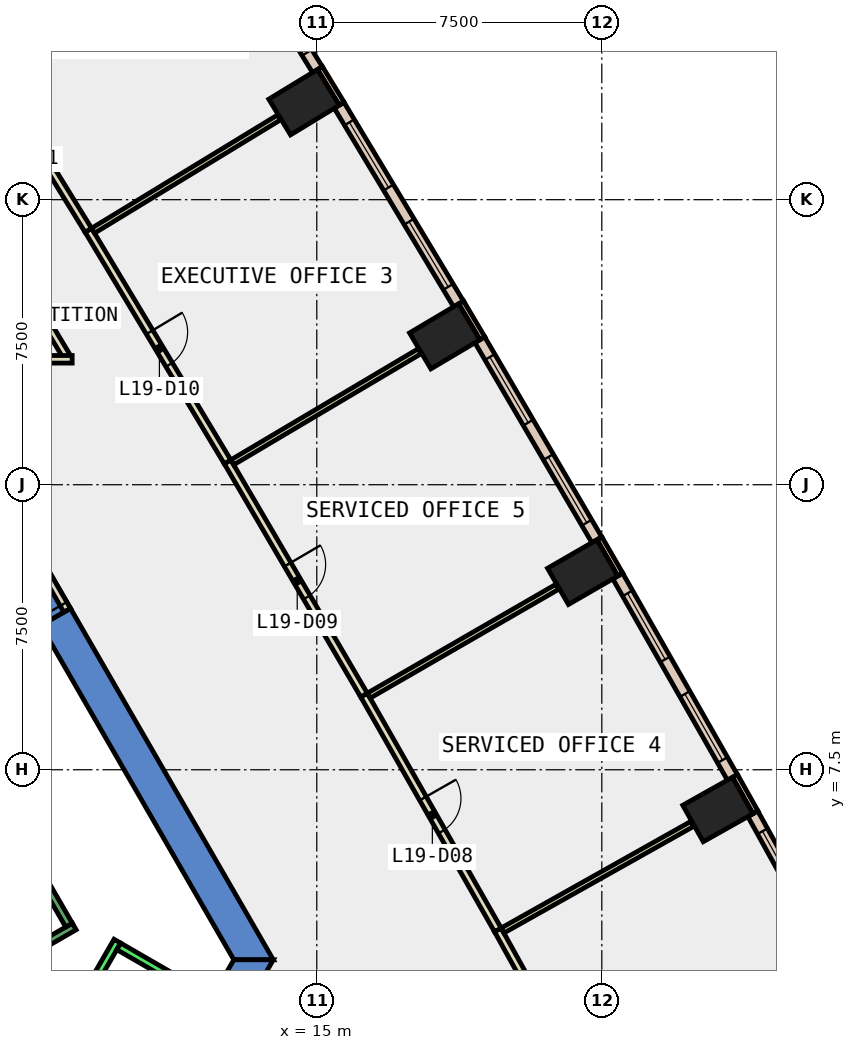
"""IFC4 building model, lengths in metres.
Left out: names, types, materials, properties, quantities, classifications, styles, units other than length and angle.
Written with IfcOpenShell. Run it as: python <this file> out.ifc"""

import sys

from ifc_helpers import new_model, si_unit, direction, frame, frame_2d, origin, origin_2d, place, context, subcontext, project, spatial, polyline, rectangle, outline, extrude, element, fill, save


model = new_model("IFC4")
c1 = context("Model", 3, precision=1e-05, world=origin(), true_north=direction((0.0, 1.0)))
c2 = subcontext(c1, "Body", "Model", "MODEL_VIEW")
j1 = project(units=[si_unit("LENGTHUNIT", "METRE"), si_unit("PLANEANGLEUNIT", "RADIAN")], contexts=[c1])
p1 = place(None, origin())
s1 = spatial("IfcSite", under=j1, at=p1, CompositionType="ELEMENT")
p2 = place(p1, origin())
s2 = spatial("IfcBuilding", under=s1, at=p2, CompositionType="ELEMENT")
p3 = place(p2, frame((0.0, 0.0, 90.8)))
s3 = spatial("IfcBuildingStorey", under=s2, at=p3, CompositionType="ELEMENT", Elevation=90.8)
for number, where, z_axis, x_axis in (
    (1, (25.554, 6.454, -0.4), (0.0, 0.0, 1.0), (-0.49, 0.872, 0.0)),
    (2, (21.997, 12.7, -0.4), (0.0, 0.0, 1.0), (-0.5, 0.866, 0.0)),
    (3, (18.367, 18.904, -0.4), (0.0, 0.0, 1.0), (-0.51, 0.86, 0.0)),
    (4, (14.664, 25.065, -0.4), (0.0, 0.0, 1.0), (-0.52, 0.854, 0.0)),
):
    element("IfcColumn", number, at=place(p3, frame(where, z_axis=z_axis, x_axis=x_axis)), inside=s3, PredefinedType="COLUMN", context=c2, shape_type="SweptSolid", body=[
        extrude(rectangle(XDim=1.1, YDim=1.5, at=origin_2d()), origin(), (0.0, 0.0, 1.0), 4.2),
    ])
p4 = place(p3, frame((0.0, 0.0, -0.4)))
e5 = element("IfcWall", 5, at=p4, inside=s3, PredefinedType="SHEAR", context=c2, shape_type="SweptSolid", body=[
    extrude(outline(polyline([(8.517, 11.748), (7.738, 11.298), (12.817, 2.5), (13.856, 2.5), (8.517, 11.748)])), origin(), (0.0, 0.0, 1.0), 4.2),
])
p5 = place(p3, frame((0.0, 0.0, 3.6)))
e6 = element("IfcWall", 6, at=p5, inside=s3, PredefinedType="SHEAR", context=c2, shape_type="SweptSolid", body=[
    extrude(outline(polyline([(7.517, 13.48), (6.738, 13.03), (7.738, 11.298), (8.517, 11.748), (7.517, 13.48)])), origin(), (0.0, 0.0, 1.0), 0.2),
])
p6 = place(p3, frame((0.0, 0.0, -0.4)))
e7 = element("IfcWall", 7, at=p6, inside=s3, PredefinedType="SHEAR", context=c2, shape_type="SweptSolid", body=[
    extrude(outline(polyline([(11.888, 0.89), (12.667, 0.44), (13.856, 2.5), (12.817, 2.5), (11.888, 0.89)])), origin(), (0.0, 0.0, 1.0), 4.2),
])
p7 = place(p3, frame((26.543, 6.379, 0.0), z_axis=(0.0, 0.0, 1.0), x_axis=(-0.490008344094, 0.871717742574, 0.0)))
e8 = element("IfcWall", 8, at=p7, inside=s3, PredefinedType="STANDARD", context=c2, shape_type="SweptSolid", body=[
    extrude(rectangle(XDim=1.1, YDim=0.15, at=frame_2d((0.55, 0.0))), origin(), (0.0, 0.0, 1.0), 3.8),
])
p8 = place(p3, frame((22.986, 12.636, 0.0), z_axis=(0.0, 0.0, 1.0), x_axis=(-0.499837685251, 0.86611909597, 0.0)))
e9 = element("IfcWall", 9, at=p8, inside=s3, PredefinedType="STANDARD", context=c2, shape_type="SweptSolid", body=[
    extrude(rectangle(XDim=1.1, YDim=0.15, at=frame_2d((0.55, 0.0))), origin(), (0.0, 0.0, 1.0), 3.8),
])
p9 = place(p3, frame((19.357, 18.852, 0.0), z_axis=(0.0, 0.0, 1.0), x_axis=(-0.510082245696, 0.860125631885, 0.0)))
e10 = element("IfcWall", 10, at=p9, inside=s3, PredefinedType="STANDARD", context=c2, shape_type="SweptSolid", body=[
    extrude(rectangle(XDim=1.1, YDim=0.15, at=frame_2d((0.55, 0.0))), origin(), (0.0, 0.0, 1.0), 3.8),
])
p10 = place(p3, frame((15.655, 25.024, 0.0), z_axis=(0.0, 0.0, 1.0), x_axis=(-0.51977099384, 0.854305632641, 0.0)))
e11 = element("IfcWall", 11, at=p10, inside=s3, PredefinedType="STANDARD", context=c2, shape_type="SweptSolid", body=[
    extrude(rectangle(XDim=1.101, YDim=0.15, at=frame_2d((0.55, 0.0))), origin(), (0.0, 0.0, 1.0), 3.8),
])
p11 = place(p3, frame((29.431, 1.007, 0.0), z_axis=(0.0, 0.0, 1.0), x_axis=(-0.484823579315, 0.874611969356, 0.0)))
e12 = element("IfcWall", 12, at=p11, inside=s3, PredefinedType="STANDARD", context=c2, shape_type="SweptSolid", body=[
    extrude(rectangle(XDim=6.099, YDim=0.3, at=frame_2d((3.049, 0.0))), origin(), (0.0, 0.0, 1.0), 3.8),
])
p12 = place(p11, frame((0.525, 0.0, 0.9)))
e13 = element("IfcOpeningElement", 13, at=p12, cuts=e12, PredefinedType="OPENING", context=c2, shape_type="SweptSolid", body=[
    extrude(rectangle(XDim=2.0, YDim=2.6, at=frame_2d((1.0, 1.3))), frame((0.0, 0.16, 0.0), z_axis=(0.0, -1.0, 0.0), x_axis=(1.0, 0.0, 0.0)), (0.0, 0.0, 1.0), 0.32),
])
p13 = place(p11, frame((3.574, 0.0, 0.9)))
e14 = element("IfcOpeningElement", 14, at=p13, cuts=e12, PredefinedType="OPENING", context=c2, shape_type="SweptSolid", body=[
    extrude(rectangle(XDim=2.0, YDim=2.6, at=frame_2d((1.0, 1.3))), frame((0.0, 0.16, 0.0), z_axis=(0.0, -1.0, 0.0), x_axis=(1.0, 0.0, 0.0)), (0.0, 0.0, 1.0), 0.32),
])
p14 = place(p3, frame((25.936, 7.299, 0.0), z_axis=(0.0, 0.0, 1.0), x_axis=(-0.49492259535, 0.868937065967, 0.0)))
e15 = element("IfcWall", 15, at=p14, inside=s3, PredefinedType="STANDARD", context=c2, shape_type="SweptSolid", body=[
    extrude(rectangle(XDim=6.098, YDim=0.3, at=frame_2d((3.049, 0.0))), origin(), (0.0, 0.0, 1.0), 3.8),
])
p15 = place(p14, frame((0.525, 0.0, 0.9)))
e16 = element("IfcOpeningElement", 16, at=p15, cuts=e15, PredefinedType="OPENING", context=c2, shape_type="SweptSolid", body=[
    extrude(rectangle(XDim=2.0, YDim=2.6, at=frame_2d((1.0, 1.3))), frame((0.0, 0.16, 0.0), z_axis=(0.0, -1.0, 0.0), x_axis=(1.0, 0.0, 0.0)), (0.0, 0.0, 1.0), 0.32),
])
p16 = place(p14, frame((3.574, 0.0, 0.9)))
e17 = element("IfcOpeningElement", 17, at=p16, cuts=e15, PredefinedType="OPENING", context=c2, shape_type="SweptSolid", body=[
    extrude(rectangle(XDim=2.0, YDim=2.6, at=frame_2d((1.0, 1.3))), frame((0.0, 0.16, 0.0), z_axis=(0.0, -1.0, 0.0), x_axis=(1.0, 0.0, 0.0)), (0.0, 0.0, 1.0), 0.32),
])
p17 = place(p3, frame((22.369, 13.549, 0.0), z_axis=(0.0, 0.0, 1.0), x_axis=(-0.504998117261, 0.863120444413, 0.0)))
e18 = element("IfcWall", 18, at=p17, inside=s3, PredefinedType="STANDARD", context=c2, shape_type="SweptSolid", body=[
    extrude(rectangle(XDim=6.099, YDim=0.3, at=frame_2d((3.049, 0.0))), origin(), (0.0, 0.0, 1.0), 3.8),
])
p18 = place(p17, frame((0.525, 0.0, 0.9)))
e19 = element("IfcOpeningElement", 19, at=p18, cuts=e18, PredefinedType="OPENING", context=c2, shape_type="SweptSolid", body=[
    extrude(rectangle(XDim=2.0, YDim=2.6, at=frame_2d((1.0, 1.3))), frame((0.0, 0.16, 0.0), z_axis=(0.0, -1.0, 0.0), x_axis=(1.0, 0.0, 0.0)), (0.0, 0.0, 1.0), 0.32),
])
p19 = place(p17, frame((3.574, 0.0, 0.9)))
e20 = element("IfcOpeningElement", 20, at=p19, cuts=e18, PredefinedType="OPENING", context=c2, shape_type="SweptSolid", body=[
    extrude(rectangle(XDim=2.0, YDim=2.6, at=frame_2d((1.0, 1.3))), frame((0.0, 0.16, 0.0), z_axis=(0.0, -1.0, 0.0), x_axis=(1.0, 0.0, 0.0)), (0.0, 0.0, 1.0), 0.32),
])
p20 = place(p3, frame((18.729, 19.757, 0.0), z_axis=(0.0, 0.0, 1.0), x_axis=(-0.515102053092, 0.857128855483, 0.0)))
e21 = element("IfcWall", 21, at=p20, inside=s3, PredefinedType="STANDARD", context=c2, shape_type="SweptSolid", body=[
    extrude(rectangle(XDim=6.098, YDim=0.3, at=frame_2d((3.049, 0.0))), origin(), (0.0, 0.0, 1.0), 3.8),
])
p21 = place(p20, frame((0.525, 0.0, 0.9)))
e22 = element("IfcOpeningElement", 22, at=p21, cuts=e21, PredefinedType="OPENING", context=c2, shape_type="SweptSolid", body=[
    extrude(rectangle(XDim=2.0, YDim=2.6, at=frame_2d((1.0, 1.3))), frame((0.0, 0.16, 0.0), z_axis=(0.0, -1.0, 0.0), x_axis=(1.0, 0.0, 0.0)), (0.0, 0.0, 1.0), 0.32),
])
p22 = place(p20, frame((3.574, 0.0, 0.9)))
e23 = element("IfcOpeningElement", 23, at=p22, cuts=e21, PredefinedType="OPENING", context=c2, shape_type="SweptSolid", body=[
    extrude(rectangle(XDim=2.0, YDim=2.6, at=frame_2d((1.0, 1.3))), frame((0.0, 0.16, 0.0), z_axis=(0.0, -1.0, 0.0), x_axis=(1.0, 0.0, 0.0)), (0.0, 0.0, 1.0), 0.32),
])
p23 = place(p3, frame((15.017, 25.922, 0.0), z_axis=(0.0, 0.0, 1.0), x_axis=(-0.525204788886, 0.850975869065, 0.0)))
e24 = element("IfcWall", 24, at=p23, inside=s3, PredefinedType="STANDARD", context=c2, shape_type="SweptSolid", body=[
    extrude(rectangle(XDim=6.099, YDim=0.3, at=frame_2d((3.049, 0.0))), origin(), (0.0, 0.0, 1.0), 3.8),
])
p24 = place(p23, frame((0.525, 0.0, 0.9)))
e25 = element("IfcOpeningElement", 25, at=p24, cuts=e24, PredefinedType="OPENING", context=c2, shape_type="SweptSolid", body=[
    extrude(rectangle(XDim=2.0, YDim=2.6, at=frame_2d((1.0, 1.3))), frame((0.0, 0.16, 0.0), z_axis=(0.0, -1.0, 0.0), x_axis=(1.0, 0.0, 0.0)), (0.0, 0.0, 1.0), 0.32),
])
p25 = place(p23, frame((3.574, 0.0, 0.9)))
e26 = element("IfcOpeningElement", 26, at=p25, cuts=e24, PredefinedType="OPENING", context=c2, shape_type="SweptSolid", body=[
    extrude(rectangle(XDim=2.0, YDim=2.6, at=frame_2d((1.0, 1.3))), frame((0.0, 0.16, 0.0), z_axis=(0.0, -1.0, 0.0), x_axis=(1.0, 0.0, 0.0)), (0.0, 0.0, 1.0), 0.32),
])
p26 = place(p3, frame((8.411, 18.386, 0.0), z_axis=(0.0, 0.0, 1.0), x_axis=(-0.515008089027, 0.857185317325, 0.0)))
e27 = element("IfcWall", 27, at=p26, inside=s3, PredefinedType="PARTITIONING", context=c2, shape_type="SweptSolid", body=[
    extrude(rectangle(XDim=2.452, YDim=0.2, at=frame_2d((1.226, 0.0))), origin(), (0.0, 0.0, 1.0), 3.8),
])
p27 = place(p3, frame((19.764, 3.286, 0.0), z_axis=(0.0, 0.0, 1.0), x_axis=(0.484858403734, -0.874592664232, 0.0)))
e28 = element("IfcWall", 28, at=p27, inside=s3, PredefinedType="PARTITIONING", context=c2, shape_type="SweptSolid", body=[
    extrude(rectangle(XDim=7.109, YDim=0.2, at=frame_2d((3.555, 0.0))), origin(), (0.0, 0.0, 1.0), 3.8),
])
p28 = place(p27, frame((3.13, 0.0, 0.0)))
e29 = element("IfcOpeningElement", 29, at=p28, cuts=e28, PredefinedType="OPENING", context=c2, shape_type="SweptSolid", body=[
    extrude(rectangle(XDim=1.0, YDim=2.1, at=frame_2d((0.5, 1.05))), frame((0.0, 0.11, 0.0), z_axis=(0.0, -1.0, 0.0), x_axis=(1.0, 0.0, 0.0)), (0.0, 0.0, 1.0), 0.22),
])
p29 = place(p3, frame((16.243, 9.465, 0.0), z_axis=(0.0, 0.0, 1.0), x_axis=(0.495081262009, -0.868846674625, 0.0)))
e30 = element("IfcWall", 30, at=p29, inside=s3, PredefinedType="PARTITIONING", context=c2, shape_type="SweptSolid", body=[
    extrude(rectangle(XDim=7.112, YDim=0.2, at=frame_2d((3.556, 0.0))), origin(), (0.0, 0.0, 1.0), 3.8),
])
p30 = place(p29, frame((3.131, 0.0, 0.0)))
e31 = element("IfcOpeningElement", 31, at=p30, cuts=e30, PredefinedType="OPENING", context=c2, shape_type="SweptSolid", body=[
    extrude(rectangle(XDim=1.0, YDim=2.1, at=frame_2d((0.5, 1.05))), frame((0.0, 0.11, 0.0), z_axis=(0.0, -1.0, 0.0), x_axis=(1.0, 0.0, 0.0)), (0.0, 0.0, 1.0), 0.22),
])
p31 = place(p3, frame((12.652, 15.602, 0.0), z_axis=(0.0, 0.0, 1.0), x_axis=(0.504914693075, -0.863169249172, 0.0)))
e32 = element("IfcWall", 32, at=p31, inside=s3, PredefinedType="PARTITIONING", context=c2, shape_type="SweptSolid", body=[
    extrude(rectangle(XDim=7.11, YDim=0.2, at=frame_2d((3.555, 0.0))), origin(), (0.0, 0.0, 1.0), 3.8),
])
p32 = place(p31, frame((3.13, 0.0, 0.0)))
e33 = element("IfcOpeningElement", 33, at=p32, cuts=e32, PredefinedType="OPENING", context=c2, shape_type="SweptSolid", body=[
    extrude(rectangle(XDim=1.0, YDim=2.1, at=frame_2d((0.5, 1.05))), frame((0.0, 0.11, 0.0), z_axis=(0.0, -1.0, 0.0), x_axis=(1.0, 0.0, 0.0)), (0.0, 0.0, 1.0), 0.22),
])
p33 = place(p3, frame((8.989, 21.696, 0.0), z_axis=(0.0, 0.0, 1.0), x_axis=(0.515000602442, -0.857189815318, 0.0)))
e34 = element("IfcWall", 34, at=p33, inside=s3, PredefinedType="PARTITIONING", context=c2, shape_type="SweptSolid", body=[
    extrude(rectangle(XDim=7.11, YDim=0.2, at=frame_2d((3.555, 0.0))), origin(), (0.0, 0.0, 1.0), 3.8),
])
p34 = place(p33, frame((3.13, 0.0, 0.0)))
e35 = element("IfcOpeningElement", 35, at=p34, cuts=e34, PredefinedType="OPENING", context=c2, shape_type="SweptSolid", body=[
    extrude(rectangle(XDim=1.0, YDim=2.1, at=frame_2d((0.5, 1.05))), frame((0.0, 0.11, 0.0), z_axis=(0.0, -1.0, 0.0), x_axis=(1.0, 0.0, 0.0)), (0.0, 0.0, 1.0), 0.22),
])
p35 = place(p3, frame((5.254, 27.747, 0.0), z_axis=(0.0, 0.0, 1.0), x_axis=(0.52516023635, -0.851003364363, 0.0)))
e36 = element("IfcWall", 36, at=p35, inside=s3, PredefinedType="PARTITIONING", context=c2, shape_type="SweptSolid", body=[
    extrude(rectangle(XDim=7.11, YDim=0.2, at=frame_2d((3.555, 0.0))), origin(), (0.0, 0.0, 1.0), 3.8),
])
p36 = place(p35, frame((3.13, 0.0, 0.0)))
e37 = element("IfcOpeningElement", 37, at=p36, cuts=e36, PredefinedType="OPENING", context=c2, shape_type="SweptSolid", body=[
    extrude(rectangle(XDim=1.0, YDim=2.1, at=frame_2d((0.5, 1.05))), frame((0.0, 0.11, 0.0), z_axis=(0.0, -1.0, 0.0), x_axis=(1.0, 0.0, 0.0)), (0.0, 0.0, 1.0), 0.22),
])
p37 = place(p3, frame((0.4, 18.3, 0.0), z_axis=(0.0, 0.0, 1.0), x_axis=(1.0, 0.0, 0.0)))
e38 = element("IfcWall", 38, at=p37, inside=s3, PredefinedType="PARTITIONING", context=c2, shape_type="SweptSolid", body=[
    extrude(rectangle(XDim=8.163, YDim=0.2, at=frame_2d((4.082, 0.0))), origin(), (0.0, 0.0, 1.0), 3.8),
])
p38 = place(p37, frame((3.356, 0.0, 0.0)))
e39 = element("IfcOpeningElement", 39, at=p38, cuts=e38, PredefinedType="OPENING", context=c2, shape_type="SweptSolid", body=[
    extrude(rectangle(XDim=1.0, YDim=2.1, at=frame_2d((0.5, 1.05))), frame((0.0, 0.11, 0.0), z_axis=(0.0, -1.0, 0.0), x_axis=(1.0, 0.0, 0.0)), (0.0, 0.0, 1.0), 0.22),
])
p39 = place(p37, frame((4.456, 0.0, 0.0)))
e40 = element("IfcOpeningElement", 40, at=p39, cuts=e38, PredefinedType="OPENING", context=c2, shape_type="SweptSolid", body=[
    extrude(rectangle(XDim=1.0, YDim=2.1, at=frame_2d((0.5, 1.05))), frame((0.0, 0.11, 0.0), z_axis=(0.0, -1.0, 0.0), x_axis=(1.0, 0.0, 0.0)), (0.0, 0.0, 1.0), 0.22),
])
p40 = place(p3, frame((19.888, 3.27, 0.0), z_axis=(0.0, 0.0, 1.0), x_axis=(0.871789386467, 0.489880868828, 0.0)))
e41 = element("IfcWall", 41, at=p40, inside=s3, PredefinedType="PARTITIONING", context=c2, shape_type="SweptSolid", body=[
    extrude(rectangle(XDim=5.73, YDim=0.15, at=frame_2d((2.865, 0.0))), origin(), (0.0, 0.0, 1.0), 3.8),
])
p41 = place(p3, frame((16.367, 9.45, 0.0), z_axis=(0.0, 0.0, 1.0), x_axis=(0.866061440635, 0.499937577149, 0.0)))
e42 = element("IfcWall", 42, at=p41, inside=s3, PredefinedType="PARTITIONING", context=c2, shape_type="SweptSolid", body=[
    extrude(rectangle(XDim=5.731, YDim=0.15, at=frame_2d((2.865, 0.0))), origin(), (0.0, 0.0, 1.0), 3.8),
])
p42 = place(p3, frame((12.776, 15.589, 0.0), z_axis=(0.0, 0.0, 1.0), x_axis=(0.860225086153, 0.509914503768, 0.0)))
e43 = element("IfcWall", 43, at=p42, inside=s3, PredefinedType="PARTITIONING", context=c2, shape_type="SweptSolid", body=[
    extrude(rectangle(XDim=5.73, YDim=0.15, at=frame_2d((2.865, 0.0))), origin(), (0.0, 0.0, 1.0), 3.8),
])
p43 = place(p3, frame((9.113, 21.684, 0.0), z_axis=(0.0, 0.0, 1.0), x_axis=(0.854075097122, 0.520149717367, 0.0)))
e44 = element("IfcWall", 44, at=p43, inside=s3, PredefinedType="PARTITIONING", context=c2, shape_type="SweptSolid", body=[
    extrude(rectangle(XDim=5.729, YDim=0.15, at=frame_2d((2.865, 0.0))), origin(), (0.0, 0.0, 1.0), 3.8),
])
p44 = place(p3, frame((8.43, 11.698, 0.0), z_axis=(0.0, 0.0, 1.0), x_axis=(-0.50002537861, 0.866010750942, 0.0)))
e45 = element("IfcWall", 45, at=p44, inside=s3, PredefinedType="PARTITIONING", context=c2, shape_type="SweptSolid", body=[
    extrude(rectangle(XDim=2.0, YDim=0.2, at=frame_2d((1.0, 0.0))), origin(), (0.0, 0.0, 1.0), 2.4),
])
p45 = place(p44, frame((0.19, 0.0, 0.0)))
e46 = element("IfcOpeningElement", 46, at=p45, cuts=e45, PredefinedType="OPENING", context=c2, shape_type="SweptSolid", body=[
    extrude(rectangle(XDim=1.8, YDim=2.1, at=frame_2d((0.9, 1.05))), frame((0.0, 0.11, 0.0), z_axis=(0.0, -1.0, 0.0), x_axis=(1.0, 0.0, 0.0)), (0.0, 0.0, 1.0), 0.22),
])
p46 = place(p3, frame((4.451, -6.19, 0.0), z_axis=(0.0, 0.0, 1.0), x_axis=(0.50000090737, 0.866024879913, 0.0)))
e47 = element("IfcWall", 47, at=p46, inside=s3, PredefinedType="STANDARD", context=c2, shape_type="SweptSolid", body=[
    extrude(rectangle(XDim=10.6, YDim=0.2, at=frame_2d((5.3, 0.0))), origin(), (0.0, 0.0, 1.0), 3.8),
])
p47 = place(p3, frame((9.788, 2.853, 0.0), z_axis=(0.0, 0.0, 1.0), x_axis=(0.865998541277, -0.500046524342, 0.0)))
e48 = element("IfcWall", 48, at=p47, inside=s3, PredefinedType="STANDARD", context=c2, shape_type="SweptSolid", body=[
    extrude(rectangle(XDim=2.5, YDim=0.2, at=frame_2d((1.25, 0.0))), origin(), (0.0, 0.0, 1.0), 3.8),
])
p48 = place(p3, frame((4.806, 1.176, 0.0), z_axis=(0.0, 0.0, 1.0), x_axis=(0.866059941101, 0.499940174841, 0.0)))
e49 = element("IfcWall", 49, at=p48, inside=s3, PredefinedType="STANDARD", context=c2, shape_type="SweptSolid", body=[
    extrude(rectangle(XDim=4.4, YDim=0.2, at=frame_2d((2.2, 0.0))), origin(), (0.0, 0.0, 1.0), 3.8),
])
p49 = place(p48, frame((1.65, 0.0, 0.0)))
e50 = element("IfcOpeningElement", 50, at=p49, cuts=e49, PredefinedType="OPENING", context=c2, shape_type="SweptSolid", body=[
    extrude(rectangle(XDim=1.1, YDim=2.2, at=frame_2d((0.55, 1.1))), frame((0.0, 0.11, 0.0), z_axis=(0.0, -1.0, 0.0), x_axis=(1.0, 0.0, 0.0)), (0.0, 0.0, 1.0), 0.22),
])
p50 = place(p3, frame((8.48, 3.412, 0.0), z_axis=(0.0, 0.0, 1.0), x_axis=(-0.499978703459, 0.866037698999, 0.0)))
e51 = element("IfcWall", 51, at=p50, inside=s3, PredefinedType="STANDARD", context=c2, shape_type="SweptSolid", body=[
    extrude(rectangle(XDim=6.9, YDim=0.2, at=frame_2d((3.45, 0.0))), origin(), (0.0, 0.0, 1.0), 3.8),
])
p51 = place(p13, origin())
e52 = element("IfcWindow", 52, at=p51, inside=s3, PartitioningType="SINGLE_PANEL", PredefinedType="WINDOW", context=c2, shape_type="SweptSolid", body=[
    extrude(rectangle(XDim=2.0, YDim=2.6, at=frame_2d((1.0, 1.3))), frame((0.0, 0.03, 0.0), z_axis=(0.0, -1.0, 0.0), x_axis=(1.0, 0.0, 0.0)), (0.0, 0.0, 1.0), 0.06),
])
fill(e14, e52)
p52 = place(p15, origin())
e53 = element("IfcWindow", 53, at=p52, inside=s3, PartitioningType="SINGLE_PANEL", PredefinedType="WINDOW", context=c2, shape_type="SweptSolid", body=[
    extrude(rectangle(XDim=2.0, YDim=2.6, at=frame_2d((1.0, 1.3))), frame((0.0, 0.03, 0.0), z_axis=(0.0, -1.0, 0.0), x_axis=(1.0, 0.0, 0.0)), (0.0, 0.0, 1.0), 0.06),
])
fill(e16, e53)
p53 = place(p16, origin())
e54 = element("IfcWindow", 54, at=p53, inside=s3, PartitioningType="SINGLE_PANEL", PredefinedType="WINDOW", context=c2, shape_type="SweptSolid", body=[
    extrude(rectangle(XDim=2.0, YDim=2.6, at=frame_2d((1.0, 1.3))), frame((0.0, 0.03, 0.0), z_axis=(0.0, -1.0, 0.0), x_axis=(1.0, 0.0, 0.0)), (0.0, 0.0, 1.0), 0.06),
])
fill(e17, e54)
p54 = place(p18, origin())
e55 = element("IfcWindow", 55, at=p54, inside=s3, PartitioningType="SINGLE_PANEL", PredefinedType="WINDOW", context=c2, shape_type="SweptSolid", body=[
    extrude(rectangle(XDim=2.0, YDim=2.6, at=frame_2d((1.0, 1.3))), frame((0.0, 0.03, 0.0), z_axis=(0.0, -1.0, 0.0), x_axis=(1.0, 0.0, 0.0)), (0.0, 0.0, 1.0), 0.06),
])
fill(e19, e55)
p55 = place(p19, origin())
e56 = element("IfcWindow", 56, at=p55, inside=s3, PartitioningType="SINGLE_PANEL", PredefinedType="WINDOW", context=c2, shape_type="SweptSolid", body=[
    extrude(rectangle(XDim=2.0, YDim=2.6, at=frame_2d((1.0, 1.3))), frame((0.0, 0.03, 0.0), z_axis=(0.0, -1.0, 0.0), x_axis=(1.0, 0.0, 0.0)), (0.0, 0.0, 1.0), 0.06),
])
fill(e20, e56)
p56 = place(p21, origin())
e57 = element("IfcWindow", 57, at=p56, inside=s3, PartitioningType="SINGLE_PANEL", PredefinedType="WINDOW", context=c2, shape_type="SweptSolid", body=[
    extrude(rectangle(XDim=2.0, YDim=2.6, at=frame_2d((1.0, 1.3))), frame((0.0, 0.03, 0.0), z_axis=(0.0, -1.0, 0.0), x_axis=(1.0, 0.0, 0.0)), (0.0, 0.0, 1.0), 0.06),
])
fill(e22, e57)
p57 = place(p22, origin())
e58 = element("IfcWindow", 58, at=p57, inside=s3, PartitioningType="SINGLE_PANEL", PredefinedType="WINDOW", context=c2, shape_type="SweptSolid", body=[
    extrude(rectangle(XDim=2.0, YDim=2.6, at=frame_2d((1.0, 1.3))), frame((0.0, 0.03, 0.0), z_axis=(0.0, -1.0, 0.0), x_axis=(1.0, 0.0, 0.0)), (0.0, 0.0, 1.0), 0.06),
])
fill(e23, e58)
p58 = place(p24, origin())
e59 = element("IfcWindow", 59, at=p58, inside=s3, PartitioningType="SINGLE_PANEL", PredefinedType="WINDOW", context=c2, shape_type="SweptSolid", body=[
    extrude(rectangle(XDim=2.0, YDim=2.6, at=frame_2d((1.0, 1.3))), frame((0.0, 0.03, 0.0), z_axis=(0.0, -1.0, 0.0), x_axis=(1.0, 0.0, 0.0)), (0.0, 0.0, 1.0), 0.06),
])
fill(e25, e59)
p59 = place(p30, origin())
e60 = element("IfcDoor", 60, at=p59, inside=s3, OperationType="SINGLE_SWING_LEFT", PredefinedType="DOOR", context=c2, shape_type="SweptSolid", body=[
    extrude(rectangle(XDim=1.0, YDim=2.1, at=frame_2d((0.5, 1.05))), frame((0.0, 0.025, 0.0), z_axis=(0.0, -1.0, 0.0), x_axis=(1.0, 0.0, 0.0)), (0.0, 0.0, 1.0), 0.05),
])
fill(e31, e60)
p60 = place(p32, origin())
e61 = element("IfcDoor", 61, at=p60, inside=s3, OperationType="SINGLE_SWING_LEFT", PredefinedType="DOOR", context=c2, shape_type="SweptSolid", body=[
    extrude(rectangle(XDim=1.0, YDim=2.1, at=frame_2d((0.5, 1.05))), frame((0.0, 0.025, 0.0), z_axis=(0.0, -1.0, 0.0), x_axis=(1.0, 0.0, 0.0)), (0.0, 0.0, 1.0), 0.05),
])
fill(e33, e61)
p61 = place(p34, origin())
e62 = element("IfcDoor", 62, at=p61, inside=s3, OperationType="SINGLE_SWING_LEFT", PredefinedType="DOOR", context=c2, shape_type="SweptSolid", body=[
    extrude(rectangle(XDim=1.0, YDim=2.1, at=frame_2d((0.5, 1.05))), frame((0.0, 0.025, 0.0), z_axis=(0.0, -1.0, 0.0), x_axis=(1.0, 0.0, 0.0)), (0.0, 0.0, 1.0), 0.05),
])
fill(e35, e62)
p62 = place(p45, origin())
e63 = element("IfcDoor", 63, at=p62, inside=s3, OperationType="DOUBLE_DOOR_SINGLE_SWING", PredefinedType="DOOR", context=c2, shape_type="SweptSolid", body=[
    extrude(rectangle(XDim=1.8, YDim=2.1, at=frame_2d((0.9, 1.05))), frame((0.0, 0.025, 0.0), z_axis=(0.0, -1.0, 0.0), x_axis=(1.0, 0.0, 0.0)), (0.0, 0.0, 1.0), 0.05),
])
fill(e46, e63)
save(model, sys.argv[1])
